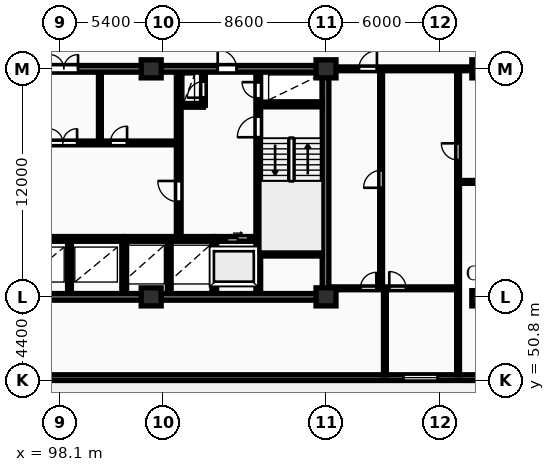
"""IFC4 building model, lengths in metres.
Left out: names, types, materials, properties, quantities, classifications, styles, units other than length and angle.
Written with IfcOpenShell. Run it as: python <this file> out.ifc"""

import sys

from ifc_helpers import new_model, si_unit, direction, frame, frame_2d, origin, origin_2d, place, context, subcontext, project, spatial, rectangle, extrude, element, fill, save


model = new_model("IFC4")
c1 = context("Model", 3, precision=1e-05, world=origin(), true_north=direction((0.0, 1.0)))
c2 = subcontext(c1, "Body", "Model", "MODEL_VIEW")
j1 = project(units=[si_unit("LENGTHUNIT", "METRE"), si_unit("PLANEANGLEUNIT", "RADIAN")], contexts=[c1])
p1 = place(None, origin())
s1 = spatial("IfcSite", under=j1, at=p1, CompositionType="ELEMENT")
p2 = place(p1, origin())
s2 = spatial("IfcBuilding", under=s1, at=p2, CompositionType="ELEMENT")
p3 = place(p2, frame((0.0, 0.0, 24.0)))
s3 = spatial("IfcBuildingStorey", under=s2, at=p3, CompositionType="ELEMENT", Elevation=24.0)
for number, where, z_axis, x_axis in (
    (1, (102.9, 55.2, 0.0), (0.0, 0.0, 1.0), (1.0, 0.0, 0.0)),
    (2, (102.9, 67.2, 0.0), (0.0, 0.0, 1.0), (1.0, 0.0, 0.0)),
    (3, (112.1, 55.2, 0.0), (0.0, 0.0, 1.0), (1.0, 0.0, 0.0)),
    (4, (112.1, 67.2, 0.0), (0.0, 0.0, 1.0), (1.0, 0.0, 0.0)),
    (5, (120.3, 55.2, 0.0), (0.0, 0.0, 1.0), (1.0, 0.0, 0.0)),
    (6, (120.3, 67.2, 0.0), (0.0, 0.0, 1.0), (1.0, 0.0, 0.0)),
):
    element("IfcColumn", number, at=place(p3, frame(where, z_axis=z_axis, x_axis=x_axis)), inside=s3, PredefinedType="COLUMN", context=c2, shape_type="SweptSolid", body=[
        extrude(rectangle(XDim=1.05, YDim=0.95, at=origin_2d()), origin(), (0.0, 0.0, 1.0), 3.25),
    ])
p4 = place(p3, frame((55.3, 50.95, 0.0), z_axis=(0.0, 0.0, 1.0), x_axis=(1.0, 0.0, 0.0)))
e7 = element("IfcWall", 7, at=p4, inside=s3, PredefinedType="STANDARD", context=c2, shape_type="SweptSolid", body=[
    extrude(rectangle(XDim=77.6, YDim=0.3, at=frame_2d((38.8, 0.0))), origin(), (0.0, 0.0, 1.0), 2.97),
])
p5 = place(p4, frame((17.525, 0.0, 0.85)))
e8 = element("IfcOpeningElement", 8, at=p5, cuts=e7, PredefinedType="OPENING", context=c2, shape_type="SweptSolid", body=[
    extrude(rectangle(XDim=1.8, YDim=1.8, at=frame_2d((0.9, 0.9))), frame((0.0, 0.16, 0.0), z_axis=(0.0, -1.0, 0.0), x_axis=(1.0, 0.0, 0.0)), (0.0, 0.0, 1.0), 0.32),
])
p6 = place(p4, frame((60.875, 0.0, 0.85)))
e9 = element("IfcOpeningElement", 9, at=p6, cuts=e7, PredefinedType="OPENING", context=c2, shape_type="SweptSolid", body=[
    extrude(rectangle(XDim=1.8, YDim=1.8, at=frame_2d((0.9, 0.9))), frame((0.0, 0.16, 0.0), z_axis=(0.0, -1.0, 0.0), x_axis=(1.0, 0.0, 0.0)), (0.0, 0.0, 1.0), 0.32),
])
p7 = place(p4, frame((9.9, 0.0, 0.0)))
e10 = element("IfcOpeningElement", 10, at=p7, cuts=e7, PredefinedType="OPENING", context=c2, shape_type="SweptSolid", body=[
    extrude(rectangle(XDim=1.6, YDim=2.2, at=frame_2d((0.8, 1.1))), frame((0.0, 0.16, 0.0), z_axis=(0.0, -1.0, 0.0), x_axis=(1.0, 0.0, 0.0)), (0.0, 0.0, 1.0), 0.32),
])
p8 = place(p3, frame((75.95, 55.2, 0.0), z_axis=(0.0, 0.0, 1.0), x_axis=(1.0, 0.0, 0.0)))
e11 = element("IfcWall", 11, at=p8, inside=s3, PredefinedType="SHEAR", context=c2, shape_type="SweptSolid", body=[
    extrude(rectangle(XDim=36.3, YDim=0.35, at=frame_2d((18.15, 0.0))), origin(), (0.0, 0.0, 1.0), 3.25),
])
p9 = place(p3, frame((112.075, 55.375, 0.0), z_axis=(0.0, 0.0, 1.0), x_axis=(0.0, 1.0, 0.0)))
e12 = element("IfcWall", 12, at=p9, inside=s3, PredefinedType="SHEAR", context=c2, shape_type="SweptSolid", body=[
    extrude(rectangle(XDim=11.65, YDim=0.35, at=frame_2d((5.825, 0.0))), origin(), (0.0, 0.0, 1.0), 3.25),
])
p10 = place(p3, frame((75.95, 67.2, 0.0), z_axis=(0.0, 0.0, 1.0), x_axis=(1.0, 0.0, 0.0)))
e13 = element("IfcWall", 13, at=p10, inside=s3, PredefinedType="SHEAR", context=c2, shape_type="SweptSolid", body=[
    extrude(rectangle(XDim=36.3, YDim=0.35, at=frame_2d((18.15, 0.0))), origin(), (0.0, 0.0, 1.0), 3.25),
])
p11 = place(p10, frame((5.25, 0.0, 0.0)))
e14 = element("IfcOpeningElement", 14, at=p11, cuts=e13, PredefinedType="OPENING", context=c2, shape_type="SweptSolid", body=[
    extrude(rectangle(XDim=1.0, YDim=2.15, at=frame_2d((0.5, 1.075))), frame((0.0, 0.185, 0.0), z_axis=(0.0, -1.0, 0.0), x_axis=(1.0, 0.0, 0.0)), (0.0, 0.0, 1.0), 0.37),
])
p12 = place(p10, frame((21.6, 0.0, 0.0)))
e15 = element("IfcOpeningElement", 15, at=p12, cuts=e13, PredefinedType="OPENING", context=c2, shape_type="SweptSolid", body=[
    extrude(rectangle(XDim=1.5, YDim=2.2, at=frame_2d((0.75, 1.1))), frame((0.0, 0.185, 0.0), z_axis=(0.0, -1.0, 0.0), x_axis=(1.0, 0.0, 0.0)), (0.0, 0.0, 1.0), 0.37),
])
p13 = place(p10, frame((30.45, 0.0, 0.0)))
e16 = element("IfcOpeningElement", 16, at=p13, cuts=e13, PredefinedType="OPENING", context=c2, shape_type="SweptSolid", body=[
    extrude(rectangle(XDim=1.0, YDim=2.15, at=frame_2d((0.5, 1.075))), frame((0.0, 0.185, 0.0), z_axis=(0.0, -1.0, 0.0), x_axis=(1.0, 0.0, 0.0)), (0.0, 0.0, 1.0), 0.37),
])
p14 = place(p3, frame((98.6, 55.4, 0.0), z_axis=(0.0, 0.0, 1.0), x_axis=(0.0, 1.0, 0.0)))
e17 = element("IfcWall", 17, at=p14, inside=s3, PredefinedType="PARTITIONING", context=c2, shape_type="SweptSolid", body=[
    extrude(rectangle(XDim=2.72, YDim=0.2, at=frame_2d((1.36, 0.0))), origin(), (0.0, 0.0, 1.0), 2.97),
])
p15 = place(p3, frame((93.02, 58.25, 0.0), z_axis=(0.0, 0.0, 1.0), x_axis=(1.0, 0.0, 0.0)))
e18 = element("IfcWall", 18, at=p15, inside=s3, PredefinedType="SHEAR", context=c2, shape_type="SweptSolid", body=[
    extrude(rectangle(XDim=8.36, YDim=0.25, at=frame_2d((4.18, 0.0))), origin(), (0.0, 0.0, 1.0), 3.25),
])
p16 = place(p3, frame((101.48, 55.4, 0.0), z_axis=(0.0, 0.0, 1.0), x_axis=(0.0, 1.0, 0.0)))
e19 = element("IfcWall", 19, at=p16, inside=s3, PredefinedType="SHEAR", context=c2, shape_type="SweptSolid", body=[
    extrude(rectangle(XDim=2.85, YDim=0.25, at=frame_2d((1.425, 0.0))), origin(), (0.0, 0.0, 1.0), 3.25),
])
p17 = place(p3, frame((103.85, 55.4, 0.0), z_axis=(0.0, 0.0, 1.0), x_axis=(0.0, 1.0, 0.0)))
e20 = element("IfcWall", 20, at=p17, inside=s3, PredefinedType="PARTITIONING", context=c2, shape_type="SweptSolid", body=[
    extrude(rectangle(XDim=2.72, YDim=0.2, at=frame_2d((1.36, 0.0))), origin(), (0.0, 0.0, 1.0), 2.97),
])
p18 = place(p3, frame((101.55, 58.25, 0.0), z_axis=(0.0, 0.0, 1.0), x_axis=(1.0, 0.0, 0.0)))
e21 = element("IfcWall", 21, at=p18, inside=s3, PredefinedType="SHEAR", context=c2, shape_type="SweptSolid", body=[
    extrude(rectangle(XDim=4.6, YDim=0.25, at=frame_2d((2.3, 0.0))), origin(), (0.0, 0.0, 1.0), 3.25),
])
p19 = place(p3, frame((106.22, 55.4, 0.0), z_axis=(0.0, 0.0, 1.0), x_axis=(0.0, 1.0, 0.0)))
e22 = element("IfcWall", 22, at=p19, inside=s3, PredefinedType="SHEAR", context=c2, shape_type="SweptSolid", body=[
    extrude(rectangle(XDim=2.85, YDim=0.25, at=frame_2d((1.425, 0.0))), origin(), (0.0, 0.0, 1.0), 3.25),
])
p20 = place(p3, frame((106.22, 58.25, 0.0), z_axis=(0.0, 0.0, 1.0), x_axis=(1.0, 0.0, 0.0)))
e23 = element("IfcWall", 23, at=p20, inside=s3, PredefinedType="SHEAR", context=c2, shape_type="SweptSolid", body=[
    extrude(rectangle(XDim=2.46, YDim=0.25, at=frame_2d((1.23, 0.0))), origin(), (0.0, 0.0, 1.0), 3.25),
])
p21 = place(p20, frame((0.67, 0.0, 0.0)))
e24 = element("IfcOpeningElement", 24, at=p21, cuts=e23, PredefinedType="OPENING", context=c2, shape_type="SweptSolid", body=[
    extrude(rectangle(XDim=1.12, YDim=2.12, at=frame_2d((0.56, 1.06))), frame((0.0, 0.135, 0.0), z_axis=(0.0, -1.0, 0.0), x_axis=(1.0, 0.0, 0.0)), (0.0, 0.0, 1.0), 0.27),
])
p22 = place(p3, frame((100.2, 63.4, 0.0), z_axis=(0.0, 0.0, 1.0), x_axis=(0.0, 1.0, 0.0)))
e25 = element("IfcWall", 25, at=p22, inside=s3, PredefinedType="PARTITIONING", context=c2, shape_type="SweptSolid", body=[
    extrude(rectangle(XDim=3.6, YDim=0.15, at=frame_2d((1.8, 0.0))), origin(), (0.0, 0.0, 1.0), 2.97),
])
p23 = place(p3, frame((84.42, 63.3, 0.0), z_axis=(0.0, 0.0, 1.0), x_axis=(1.0, 0.0, 0.0)))
e26 = element("IfcWall", 26, at=p23, inside=s3, PredefinedType="PARTITIONING", context=c2, shape_type="SweptSolid", body=[
    extrude(rectangle(XDim=19.83, YDim=0.2, at=frame_2d((9.915, 0.0))), origin(), (0.0, 0.0, 1.0), 2.97),
])
p24 = place(p23, frame((1.15, 0.0, 0.0)))
e27 = element("IfcOpeningElement", 27, at=p24, cuts=e26, PredefinedType="OPENING", context=c2, shape_type="SweptSolid", body=[
    extrude(rectangle(XDim=0.85, YDim=2.05, at=frame_2d((0.425, 1.025))), frame((0.0, 0.11, 0.0), z_axis=(0.0, -1.0, 0.0), x_axis=(1.0, 0.0, 0.0)), (0.0, 0.0, 1.0), 0.22),
])
p25 = place(p23, frame((3.25, 0.0, 0.0)))
e28 = element("IfcOpeningElement", 28, at=p25, cuts=e26, PredefinedType="OPENING", context=c2, shape_type="SweptSolid", body=[
    extrude(rectangle(XDim=0.85, YDim=2.05, at=frame_2d((0.425, 1.025))), frame((0.0, 0.11, 0.0), z_axis=(0.0, -1.0, 0.0), x_axis=(1.0, 0.0, 0.0)), (0.0, 0.0, 1.0), 0.22),
])
p26 = place(p23, frame((13.08, 0.0, 0.0)))
e29 = element("IfcOpeningElement", 29, at=p26, cuts=e26, PredefinedType="OPENING", context=c2, shape_type="SweptSolid", body=[
    extrude(rectangle(XDim=1.5, YDim=2.2, at=frame_2d((0.75, 1.1))), frame((0.0, 0.11, 0.0), z_axis=(0.0, -1.0, 0.0), x_axis=(1.0, 0.0, 0.0)), (0.0, 0.0, 1.0), 0.22),
])
p27 = place(p23, frame((6.68, 0.0, 0.0)))
e30 = element("IfcOpeningElement", 30, at=p27, cuts=e26, PredefinedType="OPENING", context=c2, shape_type="SweptSolid", body=[
    extrude(rectangle(XDim=0.92, YDim=2.08, at=frame_2d((0.46, 1.04))), frame((0.0, 0.11, 0.0), z_axis=(0.0, -1.0, 0.0), x_axis=(1.0, 0.0, 0.0)), (0.0, 0.0, 1.0), 0.22),
])
p28 = place(p23, frame((16.33, 0.0, 0.0)))
e31 = element("IfcOpeningElement", 31, at=p28, cuts=e26, PredefinedType="OPENING", context=c2, shape_type="SweptSolid", body=[
    extrude(rectangle(XDim=0.88, YDim=2.06, at=frame_2d((0.44, 1.03))), frame((0.0, 0.11, 0.0), z_axis=(0.0, -1.0, 0.0), x_axis=(1.0, 0.0, 0.0)), (0.0, 0.0, 1.0), 0.22),
])
p29 = place(p3, frame((104.45, 65.28, 0.0), z_axis=(0.0, 0.0, 1.0), x_axis=(1.0, 0.0, 0.0)))
e32 = element("IfcWall", 32, at=p29, inside=s3, PredefinedType="PARTITIONING", context=c2, shape_type="SweptSolid", body=[
    extrude(rectangle(XDim=1.2, YDim=0.2, at=frame_2d((0.6, 0.0))), origin(), (0.0, 0.0, 1.0), 2.97),
])
p30 = place(p3, frame((105.65, 65.28, 0.0), z_axis=(0.0, 0.0, 1.0), x_axis=(0.0, 1.0, 0.0)))
e33 = element("IfcWall", 33, at=p30, inside=s3, PredefinedType="PARTITIONING", context=c2, shape_type="SweptSolid", body=[
    extrude(rectangle(XDim=1.72, YDim=0.2, at=frame_2d((0.86, 0.0))), origin(), (0.0, 0.0, 1.0), 2.97),
])
p31 = place(p30, frame((0.4, 0.0, 0.0)))
e34 = element("IfcOpeningElement", 34, at=p31, cuts=e33, PredefinedType="OPENING", context=c2, shape_type="SweptSolid", body=[
    extrude(rectangle(XDim=0.85, YDim=2.05, at=frame_2d((0.425, 1.025))), frame((0.0, 0.11, 0.0), z_axis=(0.0, -1.0, 0.0), x_axis=(1.0, 0.0, 0.0)), (0.0, 0.0, 1.0), 0.22),
])
p32 = place(p3, frame((104.35, 58.4, 0.0), z_axis=(0.0, 0.0, 1.0), x_axis=(0.0, 1.0, 0.0)))
e35 = element("IfcWall", 35, at=p32, inside=s3, PredefinedType="SHEAR", context=c2, shape_type="SweptSolid", body=[
    extrude(rectangle(XDim=8.6, YDim=0.25, at=frame_2d((4.3, 0.0))), origin(), (0.0, 0.0, 1.0), 3.25),
])
p33 = place(p32, frame((1.8, 0.0, 0.0)))
e36 = element("IfcOpeningElement", 36, at=p33, cuts=e35, PredefinedType="OPENING", context=c2, shape_type="SweptSolid", body=[
    extrude(rectangle(XDim=1.1, YDim=2.1, at=frame_2d((0.55, 1.05))), frame((0.0, 0.135, 0.0), z_axis=(0.0, -1.0, 0.0), x_axis=(1.0, 0.0, 0.0)), (0.0, 0.0, 1.0), 0.27),
])
p34 = place(p3, frame((108.535, 55.4, 0.0), z_axis=(0.0, 0.0, 1.0), x_axis=(0.0, 1.0, 0.0)))
e37 = element("IfcWall", 37, at=p34, inside=s3, PredefinedType="SHEAR", context=c2, shape_type="SweptSolid", body=[
    extrude(rectangle(XDim=11.6, YDim=0.25, at=frame_2d((5.8, 0.0))), origin(), (0.0, 0.0, 1.0), 3.25),
])
p35 = place(p34, frame((8.2, 0.0, 0.0)))
e38 = element("IfcOpeningElement", 38, at=p35, cuts=e37, PredefinedType="OPENING", context=c2, shape_type="SweptSolid", body=[
    extrude(rectangle(XDim=1.1, YDim=2.1, at=frame_2d((0.55, 1.05))), frame((0.0, 0.135, 0.0), z_axis=(0.0, -1.0, 0.0), x_axis=(1.0, 0.0, 0.0)), (0.0, 0.0, 1.0), 0.27),
])
p36 = place(p34, frame((10.25, 0.0, 0.0)))
e39 = element("IfcOpeningElement", 39, at=p36, cuts=e37, PredefinedType="OPENING", context=c2, shape_type="SweptSolid", body=[
    extrude(rectangle(XDim=0.85, YDim=2.05, at=frame_2d((0.425, 1.025))), frame((0.0, 0.135, 0.0), z_axis=(0.0, -1.0, 0.0), x_axis=(1.0, 0.0, 0.0)), (0.0, 0.0, 1.0), 0.27),
])
for number, where, z_axis, x_axis in (
    (40, (108.66, 57.475, 0.0), (0.0, 0.0, 1.0), (1.0, 0.0, 0.0)),
    (41, (108.66, 65.325, 0.0), (0.0, 0.0, 1.0), (1.0, 0.0, 0.0)),
):
    element("IfcWall", number, at=place(p3, frame(where, z_axis=z_axis, x_axis=x_axis)), inside=s3, PredefinedType="SHEAR", context=c2, shape_type="SweptSolid", body=[
        extrude(rectangle(XDim=3.24, YDim=0.25, at=frame_2d((1.62, 0.0))), origin(), (0.0, 0.0, 1.0), 3.25),
    ])
p37 = place(p3, frame((119.05, 61.25, 0.0), z_axis=(0.0, 0.0, 1.0), x_axis=(1.0, 0.0, 0.0)))
e42 = element("IfcWall", 42, at=p37, inside=s3, PredefinedType="PARTITIONING", context=c2, shape_type="SweptSolid", body=[
    extrude(rectangle(XDim=13.85, YDim=0.15, at=frame_2d((6.925, 0.0))), origin(), (0.0, 0.0, 1.0), 2.97),
])
p38 = place(p37, frame((6.505, 0.0, 0.0)))
e43 = element("IfcOpeningElement", 43, at=p38, cuts=e42, PredefinedType="OPENING", context=c2, shape_type="SweptSolid", body=[
    extrude(rectangle(XDim=0.84, YDim=2.04, at=frame_2d((0.42, 1.02))), frame((0.0, 0.085, 0.0), z_axis=(0.0, -1.0, 0.0), x_axis=(1.0, 0.0, 0.0)), (0.0, 0.0, 1.0), 0.17),
])
p39 = place(p3, frame((119.05, 51.1, 0.0), z_axis=(0.0, 0.0, 1.0), x_axis=(0.0, 1.0, 0.0)))
e44 = element("IfcWall", 44, at=p39, inside=s3, PredefinedType="PARTITIONING", context=c2, shape_type="SweptSolid", body=[
    extrude(rectangle(XDim=16.05, YDim=0.15, at=frame_2d((8.025, 0.0))), origin(), (0.0, 0.0, 1.0), 2.97),
])
p40 = place(p39, frame((11.3, 0.0, 0.0)))
e45 = element("IfcOpeningElement", 45, at=p40, cuts=e44, PredefinedType="OPENING", context=c2, shape_type="SweptSolid", body=[
    extrude(rectangle(XDim=0.88, YDim=2.06, at=frame_2d((0.44, 1.03))), frame((0.0, 0.085, 0.0), z_axis=(0.0, -1.0, 0.0), x_axis=(1.0, 0.0, 0.0)), (0.0, 0.0, 1.0), 0.17),
])
p41 = place(p3, frame((115.0, 55.65, 0.0), z_axis=(0.0, 0.0, 1.0), x_axis=(0.0, 1.0, 0.0)))
e46 = element("IfcWall", 46, at=p41, inside=s3, PredefinedType="PARTITIONING", context=c2, shape_type="SweptSolid", body=[
    extrude(rectangle(XDim=11.5, YDim=0.15, at=frame_2d((5.75, 0.0))), origin(), (0.0, 0.0, 1.0), 2.97),
])
p42 = place(p41, frame((5.29, 0.0, 0.0)))
e47 = element("IfcOpeningElement", 47, at=p42, cuts=e46, PredefinedType="OPENING", context=c2, shape_type="SweptSolid", body=[
    extrude(rectangle(XDim=0.92, YDim=2.08, at=frame_2d((0.46, 1.04))), frame((0.0, 0.085, 0.0), z_axis=(0.0, -1.0, 0.0), x_axis=(1.0, 0.0, 0.0)), (0.0, 0.0, 1.0), 0.17),
])
p43 = place(p3, frame((115.2, 51.1, 0.0), z_axis=(0.0, 0.0, 1.0), x_axis=(0.0, 1.0, 0.0)))
e48 = element("IfcWall", 48, at=p43, inside=s3, PredefinedType="PARTITIONING", context=c2, shape_type="SweptSolid", body=[
    extrude(rectangle(XDim=4.55, YDim=0.15, at=frame_2d((2.275, 0.0))), origin(), (0.0, 0.0, 1.0), 2.97),
])
p44 = place(p3, frame((112.27, 55.65, 0.0), z_axis=(0.0, 0.0, 1.0), x_axis=(1.0, 0.0, 0.0)))
e49 = element("IfcWall", 49, at=p44, inside=s3, PredefinedType="PARTITIONING", context=c2, shape_type="SweptSolid", body=[
    extrude(rectangle(XDim=6.76, YDim=0.15, at=frame_2d((3.38, 0.0))), origin(), (0.0, 0.0, 1.0), 2.97),
])
p45 = place(p44, frame((1.64, 0.0, 0.0)))
e50 = element("IfcOpeningElement", 50, at=p45, cuts=e49, PredefinedType="OPENING", context=c2, shape_type="SweptSolid", body=[
    extrude(rectangle(XDim=0.84, YDim=2.04, at=frame_2d((0.42, 1.02))), frame((0.0, 0.085, 0.0), z_axis=(0.0, -1.0, 0.0), x_axis=(1.0, 0.0, 0.0)), (0.0, 0.0, 1.0), 0.17),
])
p46 = place(p44, frame((3.16, 0.0, 0.0)))
e51 = element("IfcOpeningElement", 51, at=p46, cuts=e49, PredefinedType="OPENING", context=c2, shape_type="SweptSolid", body=[
    extrude(rectangle(XDim=0.88, YDim=2.06, at=frame_2d((0.44, 1.03))), frame((0.0, 0.085, 0.0), z_axis=(0.0, -1.0, 0.0), x_axis=(1.0, 0.0, 0.0)), (0.0, 0.0, 1.0), 0.17),
])
p47 = place(p3, frame((112.25, 67.2, 0.0), z_axis=(0.0, 0.0, 1.0), x_axis=(1.0, 0.0, 0.0)))
e52 = element("IfcWall", 52, at=p47, inside=s3, PredefinedType="PARTITIONING", context=c2, shape_type="SweptSolid", body=[
    extrude(rectangle(XDim=20.65, YDim=0.2, at=frame_2d((10.325, 0.0))), origin(), (0.0, 0.0, 1.0), 2.37),
])
p48 = place(p47, frame((1.58, 0.0, 0.0)))
e53 = element("IfcOpeningElement", 53, at=p48, cuts=e52, PredefinedType="OPENING", context=c2, shape_type="SweptSolid", body=[
    extrude(rectangle(XDim=0.95, YDim=2.15, at=frame_2d((0.475, 1.075))), frame((0.0, 0.11, 0.0), z_axis=(0.0, -1.0, 0.0), x_axis=(1.0, 0.0, 0.0)), (0.0, 0.0, 1.0), 0.22),
])
p49 = place(p6, origin())
e54 = element("IfcWindow", 54, at=p49, inside=s3, PartitioningType="SINGLE_PANEL", PredefinedType="WINDOW", context=c2, shape_type="SweptSolid", body=[
    extrude(rectangle(XDim=1.8, YDim=1.8, at=frame_2d((0.9, 0.9))), frame((0.0, 0.03, 0.0), z_axis=(0.0, -1.0, 0.0), x_axis=(1.0, 0.0, 0.0)), (0.0, 0.0, 1.0), 0.06),
])
fill(e9, e54)
p50 = place(p12, origin())
e55 = element("IfcDoor", 55, at=p50, inside=s3, OperationType="DOUBLE_DOOR_SINGLE_SWING", PredefinedType="DOOR", context=c2, shape_type="SweptSolid", body=[
    extrude(rectangle(XDim=1.5, YDim=2.2, at=frame_2d((0.75, 1.1))), frame((0.0, 0.025, 0.0), z_axis=(0.0, -1.0, 0.0), x_axis=(1.0, 0.0, 0.0)), (0.0, 0.0, 1.0), 0.05),
])
fill(e15, e55)
p51 = place(p13, origin())
e56 = element("IfcDoor", 56, at=p51, inside=s3, OperationType="SINGLE_SWING_LEFT", PredefinedType="DOOR", context=c2, shape_type="SweptSolid", body=[
    extrude(rectangle(XDim=1.0, YDim=2.15, at=frame_2d((0.5, 1.075))), frame((0.0, 0.025, 0.0), z_axis=(0.0, -1.0, 0.0), x_axis=(1.0, 0.0, 0.0)), (0.0, 0.0, 1.0), 0.05),
])
fill(e16, e56)
p52 = place(p21, origin())
e57 = element("IfcDoor", 57, at=p52, inside=s3, OperationType="SLIDING_TO_RIGHT", PredefinedType="DOOR", context=c2, shape_type="SweptSolid", body=[
    extrude(rectangle(XDim=1.12, YDim=2.12, at=frame_2d((0.56, 1.06))), frame((0.0, 0.025, 0.0), z_axis=(0.0, -1.0, 0.0), x_axis=(1.0, 0.0, 0.0)), (0.0, 0.0, 1.0), 0.05),
])
fill(e24, e57)
p53 = place(p26, origin())
e58 = element("IfcDoor", 58, at=p53, inside=s3, OperationType="DOUBLE_DOOR_SINGLE_SWING", PredefinedType="DOOR", context=c2, shape_type="SweptSolid", body=[
    extrude(rectangle(XDim=1.5, YDim=2.2, at=frame_2d((0.75, 1.1))), frame((0.0, 0.025, 0.0), z_axis=(0.0, -1.0, 0.0), x_axis=(1.0, 0.0, 0.0)), (0.0, 0.0, 1.0), 0.05),
])
fill(e29, e58)
p54 = place(p28, origin())
e59 = element("IfcDoor", 59, at=p54, inside=s3, OperationType="SINGLE_SWING_RIGHT", PredefinedType="DOOR", context=c2, shape_type="SweptSolid", body=[
    extrude(rectangle(XDim=0.88, YDim=2.06, at=frame_2d((0.44, 1.03))), frame((0.0, 0.025, 0.0), z_axis=(0.0, -1.0, 0.0), x_axis=(1.0, 0.0, 0.0)), (0.0, 0.0, 1.0), 0.05),
])
fill(e31, e59)
p55 = place(p31, origin())
e60 = element("IfcDoor", 60, at=p55, inside=s3, OperationType="SINGLE_SWING_LEFT", PredefinedType="DOOR", context=c2, shape_type="SweptSolid", body=[
    extrude(rectangle(XDim=0.85, YDim=2.05, at=frame_2d((0.425, 1.025))), frame((0.0, 0.025, 0.0), z_axis=(0.0, -1.0, 0.0), x_axis=(1.0, 0.0, 0.0)), (0.0, 0.0, 1.0), 0.05),
])
fill(e34, e60)
p56 = place(p33, origin())
e61 = element("IfcDoor", 61, at=p56, inside=s3, OperationType="SINGLE_SWING_RIGHT", PredefinedType="DOOR", context=c2, shape_type="SweptSolid", body=[
    extrude(rectangle(XDim=1.1, YDim=2.1, at=frame_2d((0.55, 1.05))), frame((0.0, 0.025, 0.0), z_axis=(0.0, -1.0, 0.0), x_axis=(1.0, 0.0, 0.0)), (0.0, 0.0, 1.0), 0.05),
])
fill(e36, e61)
p57 = place(p35, origin())
e62 = element("IfcDoor", 62, at=p57, inside=s3, OperationType="SINGLE_SWING_LEFT", PredefinedType="DOOR", context=c2, shape_type="SweptSolid", body=[
    extrude(rectangle(XDim=1.1, YDim=2.1, at=frame_2d((0.55, 1.05))), frame((0.0, 0.025, 0.0), z_axis=(0.0, -1.0, 0.0), x_axis=(1.0, 0.0, 0.0)), (0.0, 0.0, 1.0), 0.05),
])
fill(e38, e62)
p58 = place(p36, origin())
e63 = element("IfcDoor", 63, at=p58, inside=s3, OperationType="SINGLE_SWING_RIGHT", PredefinedType="DOOR", context=c2, shape_type="SweptSolid", body=[
    extrude(rectangle(XDim=0.85, YDim=2.05, at=frame_2d((0.425, 1.025))), frame((0.0, 0.025, 0.0), z_axis=(0.0, -1.0, 0.0), x_axis=(1.0, 0.0, 0.0)), (0.0, 0.0, 1.0), 0.05),
])
fill(e39, e63)
p59 = place(p40, origin())
e64 = element("IfcDoor", 64, at=p59, inside=s3, OperationType="SINGLE_SWING_RIGHT", PredefinedType="DOOR", context=c2, shape_type="SweptSolid", body=[
    extrude(rectangle(XDim=0.88, YDim=2.06, at=frame_2d((0.44, 1.03))), frame((0.0, 0.025, 0.0), z_axis=(0.0, -1.0, 0.0), x_axis=(1.0, 0.0, 0.0)), (0.0, 0.0, 1.0), 0.05),
])
fill(e45, e64)
p60 = place(p42, origin())
e65 = element("IfcDoor", 65, at=p60, inside=s3, OperationType="SINGLE_SWING_LEFT", PredefinedType="DOOR", context=c2, shape_type="SweptSolid", body=[
    extrude(rectangle(XDim=0.92, YDim=2.08, at=frame_2d((0.46, 1.04))), frame((0.0, 0.025, 0.0), z_axis=(0.0, -1.0, 0.0), x_axis=(1.0, 0.0, 0.0)), (0.0, 0.0, 1.0), 0.05),
])
fill(e47, e65)
p61 = place(p45, origin())
e66 = element("IfcDoor", 66, at=p61, inside=s3, OperationType="SINGLE_SWING_RIGHT", PredefinedType="DOOR", context=c2, shape_type="SweptSolid", body=[
    extrude(rectangle(XDim=0.84, YDim=2.04, at=frame_2d((0.42, 1.02))), frame((0.0, 0.025, 0.0), z_axis=(0.0, -1.0, 0.0), x_axis=(1.0, 0.0, 0.0)), (0.0, 0.0, 1.0), 0.05),
])
fill(e50, e66)
p62 = place(p46, origin())
e67 = element("IfcDoor", 67, at=p62, inside=s3, OperationType="SINGLE_SWING_LEFT", PredefinedType="DOOR", context=c2, shape_type="SweptSolid", body=[
    extrude(rectangle(XDim=0.88, YDim=2.06, at=frame_2d((0.44, 1.03))), frame((0.0, 0.025, 0.0), z_axis=(0.0, -1.0, 0.0), x_axis=(1.0, 0.0, 0.0)), (0.0, 0.0, 1.0), 0.05),
])
fill(e51, e67)
p63 = place(p48, origin())
e68 = element("IfcDoor", 68, at=p63, inside=s3, OperationType="SINGLE_SWING_RIGHT", PredefinedType="DOOR", context=c2, shape_type="SweptSolid", body=[
    extrude(rectangle(XDim=0.95, YDim=2.15, at=frame_2d((0.475, 1.075))), frame((0.0, 0.025, 0.0), z_axis=(0.0, -1.0, 0.0), x_axis=(1.0, 0.0, 0.0)), (0.0, 0.0, 1.0), 0.05),
])
fill(e53, e68)
save(model, sys.argv[1])
